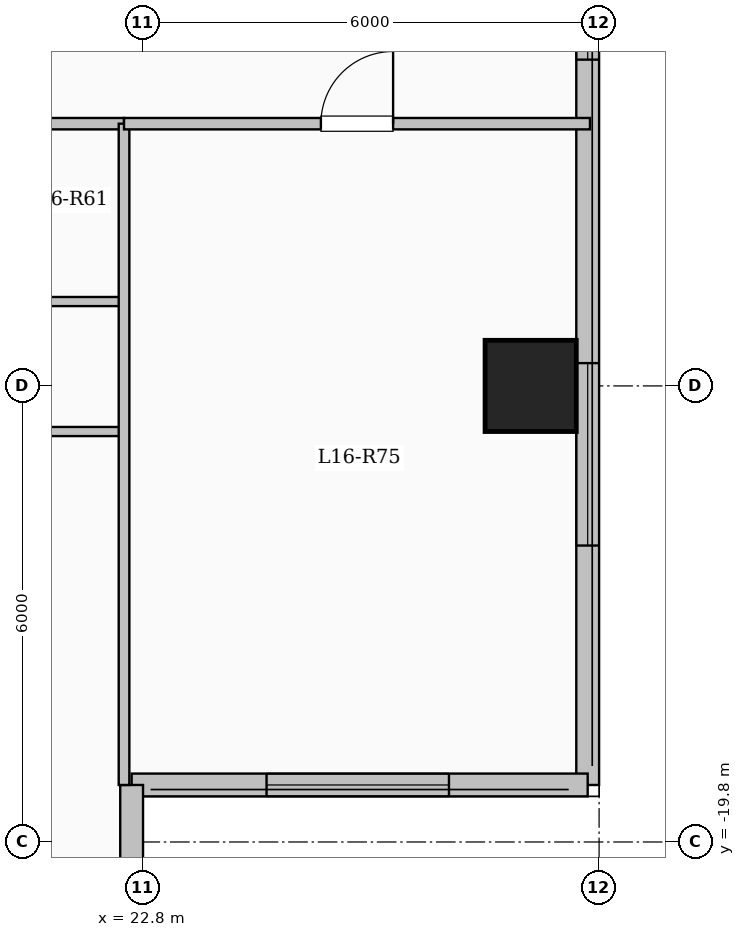
"""IFC4 building model, lengths in metres.
Left out: names, types, materials, properties, quantities, classifications, styles, units other than length and angle.
Written with IfcOpenShell. Run it as: python <this file> out.ifc"""

import sys

from ifc_helpers import new_model, si_unit, direction, frame, frame_2d, origin, origin_2d, place, context, subcontext, project, spatial, rectangle, extrude, element, fill, save


model = new_model("IFC4")
c1 = context("Model", 3, precision=1e-05, world=origin(), true_north=direction((0.0, 1.0)))
c2 = subcontext(c1, "Body", "Model", "MODEL_VIEW")
j1 = project(units=[si_unit("LENGTHUNIT", "METRE"), si_unit("PLANEANGLEUNIT", "RADIAN")], contexts=[c1])
p1 = place(None, origin())
s1 = spatial("IfcSite", under=j1, at=p1, CompositionType="ELEMENT")
p2 = place(p1, origin())
s2 = spatial("IfcBuilding", under=s1, at=p2, CompositionType="ELEMENT")
p3 = place(p2, frame((0.0, 0.0, 60.85)))
s3 = spatial("IfcBuildingStorey", under=s2, at=p3, CompositionType="ELEMENT", Elevation=60.85)
p4 = place(p3, frame((27.9, -13.8, 0.0), z_axis=(0.0, 0.0, 1.0), x_axis=(1.0, 0.0, 0.0)))
e1 = element("IfcColumn", 1, at=p4, inside=s3, PredefinedType="COLUMN", context=c2, shape_type="SweptSolid", body=[
    extrude(rectangle(XDim=1.2, YDim=1.2, at=origin_2d()), origin(), (0.0, 0.0, 1.0), 3.35),
])
p5 = place(p3, frame((28.65, 19.05, 0.0), z_axis=(0.0, 0.0, 1.0), x_axis=(0.0, -1.0, 0.0)))
e2 = element("IfcWall", 2, at=p5, inside=s3, PredefinedType="SOLIDWALL", context=c2, shape_type="SweptSolid", body=[
    extrude(rectangle(XDim=38.1, YDim=0.3, at=frame_2d((19.05, 0.0))), origin(), (0.0, 0.0, 1.0), 3.05),
])
p6 = place(p5, frame((2.275, 0.0, 0.9)))
e3 = element("IfcOpeningElement", 3, at=p6, cuts=e2, PredefinedType="OPENING", context=c2, shape_type="SweptSolid", body=[
    extrude(rectangle(XDim=2.0, YDim=1.7, at=frame_2d((1.0, 0.85))), frame((0.0, 0.16, 0.0), z_axis=(0.0, -1.0, 0.0), x_axis=(1.0, 0.0, 0.0)), (0.0, 0.0, 1.0), 0.32),
])
p7 = place(p5, frame((6.925, 0.0, 0.95)))
e4 = element("IfcOpeningElement", 4, at=p7, cuts=e2, PredefinedType="OPENING", context=c2, shape_type="SweptSolid", body=[
    extrude(rectangle(XDim=1.0, YDim=1.5, at=frame_2d((0.5, 0.75))), frame((0.0, 0.16, 0.0), z_axis=(0.0, -1.0, 0.0), x_axis=(1.0, 0.0, 0.0)), (0.0, 0.0, 1.0), 0.32),
])
p8 = place(p5, frame((16.3, 0.0, 0.9)))
e5 = element("IfcOpeningElement", 5, at=p8, cuts=e2, PredefinedType="OPENING", context=c2, shape_type="SweptSolid", body=[
    extrude(rectangle(XDim=2.0, YDim=1.7, at=frame_2d((1.0, 0.85))), frame((0.0, 0.16, 0.0), z_axis=(0.0, -1.0, 0.0), x_axis=(1.0, 0.0, 0.0)), (0.0, 0.0, 1.0), 0.32),
])
p9 = place(p5, frame((27.058, 0.0, 0.9)))
e6 = element("IfcOpeningElement", 6, at=p9, cuts=e2, PredefinedType="OPENING", context=c2, shape_type="SweptSolid", body=[
    extrude(rectangle(XDim=1.5, YDim=1.65, at=frame_2d((0.75, 0.825))), frame((0.0, 0.16, 0.0), z_axis=(0.0, -1.0, 0.0), x_axis=(1.0, 0.0, 0.0)), (0.0, 0.0, 1.0), 0.32),
])
p10 = place(p5, frame((32.55, 0.0, 0.9)))
e7 = element("IfcOpeningElement", 7, at=p10, cuts=e2, PredefinedType="OPENING", context=c2, shape_type="SweptSolid", body=[
    extrude(rectangle(XDim=2.4, YDim=1.8, at=frame_2d((1.2, 0.9))), frame((0.0, 0.16, 0.0), z_axis=(0.0, -1.0, 0.0), x_axis=(1.0, 0.0, 0.0)), (0.0, 0.0, 1.0), 0.32),
])
p11 = place(p3, frame((28.65, -19.05, 0.0), z_axis=(0.0, 0.0, 1.0), x_axis=(-1.0, 0.0, 0.0)))
e8 = element("IfcWall", 8, at=p11, inside=s3, PredefinedType="SOLIDWALL", context=c2, shape_type="SweptSolid", body=[
    extrude(rectangle(XDim=6.0, YDim=0.3, at=frame_2d((3.0, 0.0))), origin(), (0.0, 0.0, 1.0), 3.05),
])
p12 = place(p11, frame((1.825, 0.0, 0.9)))
e9 = element("IfcOpeningElement", 9, at=p12, cuts=e8, PredefinedType="OPENING", context=c2, shape_type="SweptSolid", body=[
    extrude(rectangle(XDim=2.4, YDim=1.8, at=frame_2d((1.2, 0.9))), frame((0.0, 0.16, 0.0), z_axis=(0.0, -1.0, 0.0), x_axis=(1.0, 0.0, 0.0)), (0.0, 0.0, 1.0), 0.32),
])
p13 = place(p3, frame((22.65, -19.05, 0.0), z_axis=(0.0, 0.0, 1.0), x_axis=(0.0, -1.0, 0.0)))
e10 = element("IfcWall", 10, at=p13, inside=s3, PredefinedType="SOLIDWALL", context=c2, shape_type="SweptSolid", body=[
    extrude(rectangle(XDim=4.5, YDim=0.3, at=frame_2d((2.25, 0.0))), origin(), (0.0, 0.0, 1.0), 3.05),
])
p14 = place(p13, frame((1.333, 0.0, 0.9)))
e11 = element("IfcOpeningElement", 11, at=p14, cuts=e10, PredefinedType="OPENING", context=c2, shape_type="SweptSolid", body=[
    extrude(rectangle(XDim=1.8, YDim=1.65, at=frame_2d((0.9, 0.825))), frame((0.0, 0.16, 0.0), z_axis=(0.0, -1.0, 0.0), x_axis=(1.0, 0.0, 0.0)), (0.0, 0.0, 1.0), 0.32),
])
p15 = place(p3, frame((8.55, -10.35, 0.0), z_axis=(0.0, 0.0, 1.0), x_axis=(1.0, 0.0, 0.0)))
e12 = element("IfcWall", 12, at=p15, inside=s3, PredefinedType="PARTITIONING", context=c2, shape_type="SweptSolid", body=[
    extrude(rectangle(XDim=14.0, YDim=0.15, at=frame_2d((7.0, 0.0))), origin(), (0.0, 0.0, 1.0), 3.05),
])
p16 = place(p15, frame((0.75, 0.0, 0.0)))
e13 = element("IfcOpeningElement", 13, at=p16, cuts=e12, PredefinedType="OPENING", context=c2, shape_type="SweptSolid", body=[
    extrude(rectangle(XDim=0.96, YDim=2.15, at=frame_2d((0.48, 1.075))), frame((0.0, 0.085, 0.0), z_axis=(0.0, -1.0, 0.0), x_axis=(1.0, 0.0, 0.0)), (0.0, 0.0, 1.0), 0.17),
])
p17 = place(p3, frame((18.2, -12.69, 0.0), z_axis=(0.0, 0.0, 1.0), x_axis=(1.0, 0.0, 0.0)))
e14 = element("IfcWall", 14, at=p17, inside=s3, PredefinedType="PARTITIONING", context=c2, shape_type="SweptSolid", body=[
    extrude(rectangle(XDim=4.35, YDim=0.12, at=frame_2d((2.175, 0.0))), origin(), (0.0, 0.0, 1.0), 3.05),
])
p18 = place(p17, frame((1.735, 0.0, 0.0)))
e15 = element("IfcOpeningElement", 15, at=p18, cuts=e14, PredefinedType="OPENING", context=c2, shape_type="SweptSolid", body=[
    extrude(rectangle(XDim=0.88, YDim=2.1, at=frame_2d((0.44, 1.05))), frame((0.0, 0.07, 0.0), z_axis=(0.0, -1.0, 0.0), x_axis=(1.0, 0.0, 0.0)), (0.0, 0.0, 1.0), 0.14),
])
p19 = place(p3, frame((13.302, -14.4, 0.0), z_axis=(0.0, 0.0, 1.0), x_axis=(1.0, 0.0, 0.0)))
e16 = element("IfcWall", 16, at=p19, inside=s3, PredefinedType="PARTITIONING", context=c2, shape_type="SweptSolid", body=[
    extrude(rectangle(XDim=9.308, YDim=0.12, at=frame_2d((4.654, 0.0))), origin(), (0.0, 0.0, 1.0), 3.05),
])
p20 = place(p19, frame((1.081, 0.0, 0.0)))
e17 = element("IfcOpeningElement", 17, at=p20, cuts=e16, PredefinedType="OPENING", context=c2, shape_type="SweptSolid", body=[
    extrude(rectangle(XDim=0.88, YDim=2.1, at=frame_2d((0.44, 1.05))), frame((0.0, 0.07, 0.0), z_axis=(0.0, -1.0, 0.0), x_axis=(1.0, 0.0, 0.0)), (0.0, 0.0, 1.0), 0.14),
])
p21 = place(p19, frame((4.124, 0.0, 0.0)))
e18 = element("IfcOpeningElement", 18, at=p21, cuts=e16, PredefinedType="OPENING", context=c2, shape_type="SweptSolid", body=[
    extrude(rectangle(XDim=0.88, YDim=2.1, at=frame_2d((0.44, 1.05))), frame((0.0, 0.07, 0.0), z_axis=(0.0, -1.0, 0.0), x_axis=(1.0, 0.0, 0.0)), (0.0, 0.0, 1.0), 0.14),
])
p22 = place(p19, frame((7.167, 0.0, 0.0)))
e19 = element("IfcOpeningElement", 19, at=p22, cuts=e16, PredefinedType="OPENING", context=c2, shape_type="SweptSolid", body=[
    extrude(rectangle(XDim=0.88, YDim=2.1, at=frame_2d((0.44, 1.05))), frame((0.0, 0.07, 0.0), z_axis=(0.0, -1.0, 0.0), x_axis=(1.0, 0.0, 0.0)), (0.0, 0.0, 1.0), 0.14),
])
p23 = place(p3, frame((22.55, -19.05, 0.0), z_axis=(0.0, 0.0, 1.0), x_axis=(0.0, 1.0, 0.0)))
e20 = element("IfcWall", 20, at=p23, inside=s3, PredefinedType="PARTITIONING", context=c2, shape_type="SweptSolid", body=[
    extrude(rectangle(XDim=8.7, YDim=0.14, at=frame_2d((4.35, 0.0))), origin(), (0.0, 0.0, 1.0), 3.05),
])
p24 = place(p3, frame((22.55, -10.35, 0.0), z_axis=(0.0, 0.0, 1.0), x_axis=(1.0, 0.0, 0.0)))
e21 = element("IfcWall", 21, at=p24, inside=s3, PredefinedType="PARTITIONING", context=c2, shape_type="SweptSolid", body=[
    extrude(rectangle(XDim=6.13, YDim=0.15, at=frame_2d((3.065, 0.0))), origin(), (0.0, 0.0, 1.0), 3.05),
])
p25 = place(p24, frame((2.59, 0.0, 0.0)))
e22 = element("IfcOpeningElement", 22, at=p25, cuts=e21, PredefinedType="OPENING", context=c2, shape_type="SweptSolid", body=[
    extrude(rectangle(XDim=0.95, YDim=2.15, at=frame_2d((0.475, 1.075))), frame((0.0, 0.085, 0.0), z_axis=(0.0, -1.0, 0.0), x_axis=(1.0, 0.0, 0.0)), (0.0, 0.0, 1.0), 0.17),
])
p26 = place(p9, origin())
e23 = element("IfcWindow", 23, at=p26, inside=s3, PartitioningType="SINGLE_PANEL", PredefinedType="WINDOW", context=c2, shape_type="SweptSolid", body=[
    extrude(rectangle(XDim=1.5, YDim=1.65, at=frame_2d((0.75, 0.825))), frame((0.0, 0.03, 0.0), z_axis=(0.0, -1.0, 0.0), x_axis=(1.0, 0.0, 0.0)), (0.0, 0.0, 1.0), 0.06),
])
fill(e6, e23)
p27 = place(p10, origin())
e24 = element("IfcWindow", 24, at=p27, inside=s3, PartitioningType="SINGLE_PANEL", PredefinedType="WINDOW", context=c2, shape_type="SweptSolid", body=[
    extrude(rectangle(XDim=2.4, YDim=1.8, at=frame_2d((1.2, 0.9))), frame((0.0, 0.03, 0.0), z_axis=(0.0, -1.0, 0.0), x_axis=(1.0, 0.0, 0.0)), (0.0, 0.0, 1.0), 0.06),
])
fill(e7, e24)
p28 = place(p12, origin())
e25 = element("IfcWindow", 25, at=p28, inside=s3, PartitioningType="SINGLE_PANEL", PredefinedType="WINDOW", context=c2, shape_type="SweptSolid", body=[
    extrude(rectangle(XDim=2.4, YDim=1.8, at=frame_2d((1.2, 0.9))), frame((0.0, 0.03, 0.0), z_axis=(0.0, -1.0, 0.0), x_axis=(1.0, 0.0, 0.0)), (0.0, 0.0, 1.0), 0.06),
])
fill(e9, e25)
p29 = place(p25, origin())
e26 = element("IfcDoor", 26, at=p29, inside=s3, OperationType="SINGLE_SWING_RIGHT", PredefinedType="DOOR", context=c2, shape_type="SweptSolid", body=[
    extrude(rectangle(XDim=0.95, YDim=2.15, at=frame_2d((0.475, 1.075))), frame((0.0, 0.025, 0.0), z_axis=(0.0, -1.0, 0.0), x_axis=(1.0, 0.0, 0.0)), (0.0, 0.0, 1.0), 0.05),
])
fill(e22, e26)
save(model, sys.argv[1])
